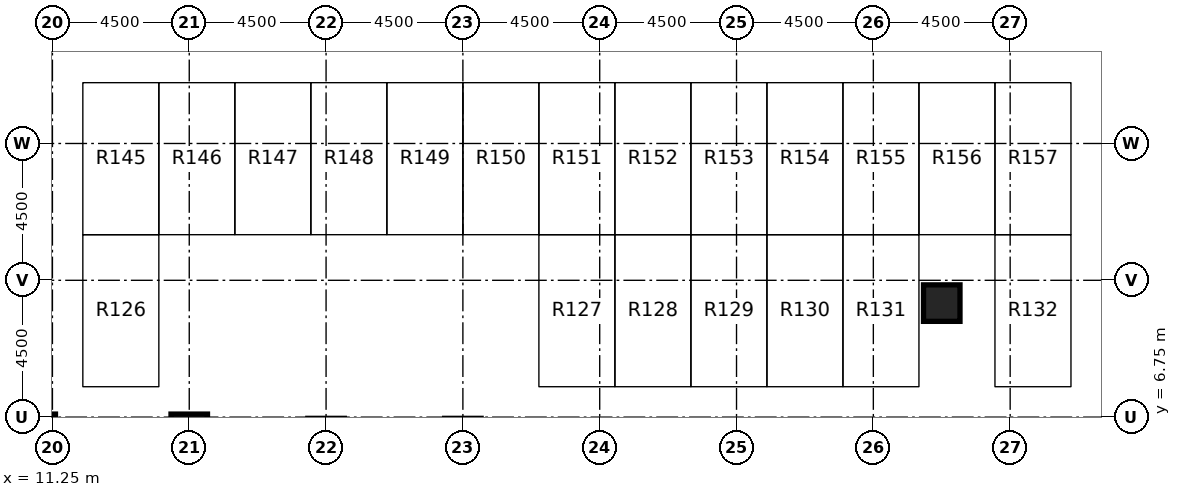
"""IFC4 building model, lengths in metres.
Left out: names, types, materials, properties, quantities, classifications, styles, units other than length and angle.
Written with IfcOpenShell. Run it as: python <this file> out.ifc"""

import sys

from ifc_helpers import new_model, si_unit, direction, frame, origin, origin_2d, place, context, subcontext, project, spatial, rectangle, extrude, element, save


model = new_model("IFC4")
c1 = context("Model", 3, precision=1e-05, world=origin(), true_north=direction((0.0, 1.0)))
c2 = subcontext(c1, "Body", "Model", "MODEL_VIEW")
j1 = project(units=[si_unit("LENGTHUNIT", "METRE"), si_unit("PLANEANGLEUNIT", "RADIAN")], contexts=[c1])
p1 = place(None, origin())
s1 = spatial("IfcSite", under=j1, at=p1, CompositionType="ELEMENT")
p2 = place(p1, origin())
s2 = spatial("IfcBuilding", under=s1, at=p2, CompositionType="ELEMENT")
p3 = place(p2, frame((0.0, 0.0, -4.0)))
s3 = spatial("IfcBuildingStorey", under=s2, at=p3, CompositionType="ELEMENT", Elevation=-4.0)
for number, where, z_axis, x_axis in (
    (1, (10.75, 6.25, 0.0), (0.0, 0.0, 1.0), (1.0, 0.0, 0.0)),
    (2, (15.75, 6.25, 0.0), (0.0, 0.0, 1.0), (1.0, 0.0, 0.0)),
    (3, (40.5, 10.5, 0.0), (0.0, 0.0, 1.0), (1.0, 0.0, 0.0)),
):
    element("IfcColumn", number, at=place(p3, frame(where, z_axis=z_axis, x_axis=x_axis)), inside=s3, PredefinedType="COLUMN", context=c2, shape_type="SweptSolid", body=[
        extrude(rectangle(XDim=1.2, YDim=1.2, at=origin_2d()), origin(), (0.0, 0.0, 1.0), 3.1),
    ])
save(model, sys.argv[1])
